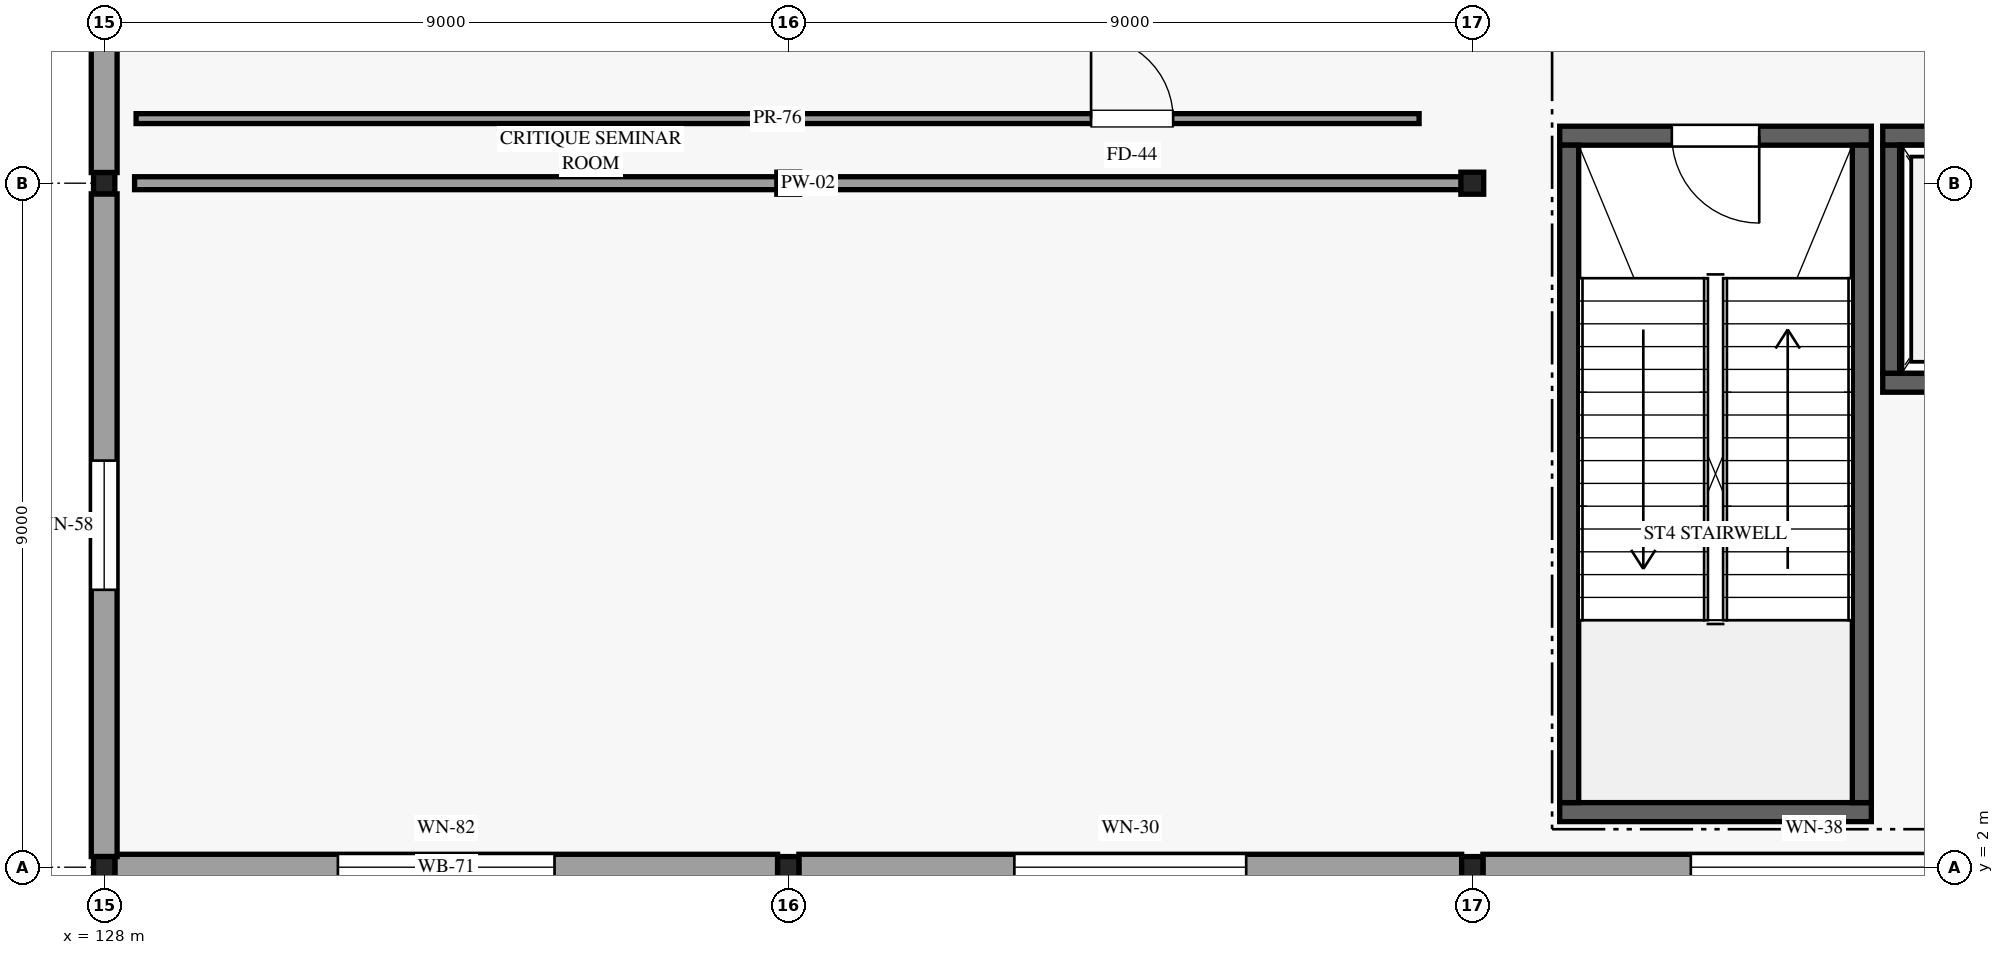
"""IFC4 building model, lengths in metres.
Left out: names, types, materials, properties, quantities, classifications, styles, units other than length and angle.
Written with IfcOpenShell. Run it as: python <this file> out.ifc"""

import sys

from ifc_helpers import new_model, si_unit, direction, frame, frame_2d, origin, origin_2d, place, context, subcontext, project, spatial, rectangle, i_section, extrude, element, fill, save


model = new_model("IFC4")
c1 = context("Model", 3, precision=1e-05, world=origin(), true_north=direction((0.0, 1.0)))
c2 = subcontext(c1, "Body", "Model", "MODEL_VIEW")
j1 = project(units=[si_unit("LENGTHUNIT", "METRE"), si_unit("PLANEANGLEUNIT", "RADIAN")], contexts=[c1])
p1 = place(None, origin())
s1 = spatial("IfcSite", under=j1, at=p1, CompositionType="ELEMENT")
p2 = place(p1, origin())
s2 = spatial("IfcBuilding", under=s1, at=p2, CompositionType="ELEMENT")
p3 = place(p2, frame((0.0, 0.0, 10.2)))
s3 = spatial("IfcBuildingStorey", under=s2, at=p3, CompositionType="ELEMENT", Elevation=10.2)
for number, where, z_axis, x_axis in (
    (1, (128.0, 2.0, 0.0), (0.0, 0.0, 1.0), (1.0, 0.0, 0.0)),
    (2, (128.0, 11.0, 0.0), (0.0, 0.0, 1.0), (1.0, 0.0, 0.0)),
    (3, (137.0, 2.0, 0.0), (0.0, 0.0, 1.0), (1.0, 0.0, 0.0)),
):
    element("IfcColumn", number, at=place(p3, frame(where, z_axis=z_axis, x_axis=x_axis)), inside=s3, PredefinedType="COLUMN", context=c2, shape_type="SweptSolid", body=[
        extrude(i_section(OverallWidth=0.28, OverallDepth=0.28, WebThickness=0.01, FlangeThickness=0.018, FilletRadius=0.024, at=origin_2d()), origin(), (0.0, 0.0, 1.0), 4.8),
    ])
p4 = place(p3, frame((137.0, 11.0, 0.0), z_axis=(0.0, 0.0, 1.0), x_axis=(1.0, 0.0, 0.0)))
e4 = element("IfcColumn", 4, at=p4, inside=s3, PredefinedType="COLUMN", context=c2, shape_type="SweptSolid", body=[
    extrude(i_section(OverallWidth=0.3, OverallDepth=0.29, WebThickness=0.009, FlangeThickness=0.014, FilletRadius=0.027, at=origin_2d()), origin(), (0.0, 0.0, 1.0), 4.8),
])
p5 = place(p3, frame((146.0, 2.0, 0.0), z_axis=(0.0, 0.0, 1.0), x_axis=(1.0, 0.0, 0.0)))
e5 = element("IfcColumn", 5, at=p5, inside=s3, PredefinedType="COLUMN", context=c2, shape_type="SweptSolid", body=[
    extrude(i_section(OverallWidth=0.28, OverallDepth=0.28, WebThickness=0.01, FlangeThickness=0.018, FilletRadius=0.024, at=origin_2d()), origin(), (0.0, 0.0, 1.0), 4.8),
])
p6 = place(p3, frame((146.0, 11.0, 0.0), z_axis=(0.0, 0.0, 1.0), x_axis=(1.0, 0.0, 0.0)))
e6 = element("IfcColumn", 6, at=p6, inside=s3, PredefinedType="COLUMN", context=c2, shape_type="SweptSolid", body=[
    extrude(i_section(OverallWidth=0.3, OverallDepth=0.29, WebThickness=0.009, FlangeThickness=0.014, FilletRadius=0.027, at=origin_2d()), origin(), (0.0, 0.0, 1.0), 4.8),
])
p7 = place(p3, frame((128.14, 2.0, 0.0), z_axis=(0.0, 0.0, 1.0), x_axis=(1.0, 0.0, 0.0)))
e7 = element("IfcWall", 7, at=p7, inside=s3, PredefinedType="STANDARD", context=c2, shape_type="SweptSolid", body=[
    extrude(rectangle(XDim=8.72, YDim=0.34, at=frame_2d((4.36, 0.0))), origin(), (0.0, 0.0, 1.0), 4.115),
])
p8 = place(p7, frame((5.785, 0.0, 0.85), z_axis=(0.0, 0.0, 1.0), x_axis=(-1.0, 0.0, 0.0)))
e8 = element("IfcOpeningElement", 8, at=p8, cuts=e7, PredefinedType="OPENING", context=c2, shape_type="SweptSolid", body=[
    extrude(rectangle(XDim=2.85, YDim=2.5, at=frame_2d((1.425, 1.25))), frame((0.0, 0.18, 0.0), z_axis=(0.0, -1.0, 0.0), x_axis=(1.0, 0.0, 0.0)), (0.0, 0.0, 1.0), 0.36),
])
p9 = place(p3, frame((137.14, 2.0, 0.0), z_axis=(0.0, 0.0, 1.0), x_axis=(1.0, 0.0, 0.0)))
e9 = element("IfcWall", 9, at=p9, inside=s3, PredefinedType="STANDARD", context=c2, shape_type="SweptSolid", body=[
    extrude(rectangle(XDim=8.72, YDim=0.34, at=frame_2d((4.36, 0.0))), origin(), (0.0, 0.0, 1.0), 4.115),
])
p10 = place(p9, frame((5.885, 0.0, 0.85), z_axis=(0.0, 0.0, 1.0), x_axis=(-1.0, 0.0, 0.0)))
e10 = element("IfcOpeningElement", 10, at=p10, cuts=e9, PredefinedType="OPENING", context=c2, shape_type="SweptSolid", body=[
    extrude(rectangle(XDim=3.05, YDim=2.55, at=frame_2d((1.525, 1.275))), frame((0.0, 0.18, 0.0), z_axis=(0.0, -1.0, 0.0), x_axis=(1.0, 0.0, 0.0)), (0.0, 0.0, 1.0), 0.36),
])
p11 = place(p3, frame((146.14, 2.0, 0.0), z_axis=(0.0, 0.0, 1.0), x_axis=(1.0, 0.0, 0.0)))
e11 = element("IfcWall", 11, at=p11, inside=s3, PredefinedType="STANDARD", context=c2, shape_type="SweptSolid", body=[
    extrude(rectangle(XDim=8.72, YDim=0.34, at=frame_2d((4.36, 0.0))), origin(), (0.0, 0.0, 1.0), 4.115),
])
p12 = place(p11, frame((5.985, 0.0, 0.85), z_axis=(0.0, 0.0, 1.0), x_axis=(-1.0, 0.0, 0.0)))
e12 = element("IfcOpeningElement", 12, at=p12, cuts=e11, PredefinedType="OPENING", context=c2, shape_type="SweptSolid", body=[
    extrude(rectangle(XDim=3.25, YDim=2.6, at=frame_2d((1.625, 1.3))), frame((0.0, 0.18, 0.0), z_axis=(0.0, -1.0, 0.0), x_axis=(1.0, 0.0, 0.0)), (0.0, 0.0, 1.0), 0.36),
])
p13 = place(p3, frame((128.0, 2.14, 0.0), z_axis=(0.0, 0.0, 1.0), x_axis=(0.0, 1.0, 0.0)))
e13 = element("IfcWall", 13, at=p13, inside=s3, PredefinedType="STANDARD", context=c2, shape_type="SweptSolid", body=[
    extrude(rectangle(XDim=8.72, YDim=0.34, at=frame_2d((4.36, 0.0))), origin(), (0.0, 0.0, 1.0), 4.115),
])
p14 = place(p13, frame((3.51, 0.0, 0.85)))
e14 = element("IfcOpeningElement", 14, at=p14, cuts=e13, PredefinedType="OPENING", context=c2, shape_type="SweptSolid", body=[
    extrude(rectangle(XDim=1.7, YDim=2.3, at=frame_2d((0.85, 1.15))), frame((0.0, 0.18, 0.0), z_axis=(0.0, -1.0, 0.0), x_axis=(1.0, 0.0, 0.0)), (0.0, 0.0, 1.0), 0.36),
])
p15 = place(p3, frame((128.0, 11.14, 0.0), z_axis=(0.0, 0.0, 1.0), x_axis=(0.0, 1.0, 0.0)))
e15 = element("IfcWall", 15, at=p15, inside=s3, PredefinedType="STANDARD", context=c2, shape_type="SweptSolid", body=[
    extrude(rectangle(XDim=8.72, YDim=0.34, at=frame_2d((4.36, 0.0))), origin(), (0.0, 0.0, 1.0), 4.115),
])
p16 = place(p15, frame((3.31, 0.0, 0.85)))
e16 = element("IfcOpeningElement", 16, at=p16, cuts=e15, PredefinedType="OPENING", context=c2, shape_type="SweptSolid", body=[
    extrude(rectangle(XDim=2.1, YDim=2.45, at=frame_2d((1.05, 1.225))), frame((0.0, 0.18, 0.0), z_axis=(0.0, -1.0, 0.0), x_axis=(1.0, 0.0, 0.0)), (0.0, 0.0, 1.0), 0.36),
])
p17 = place(p3, frame((147.15, 11.625, 0.0), z_axis=(0.0, 0.0, 1.0), x_axis=(1.0, 0.0, 0.0)))
e17 = element("IfcWall", 17, at=p17, inside=s3, PredefinedType="SHEAR", context=c2, shape_type="SweptSolid", body=[
    extrude(rectangle(XDim=4.1, YDim=0.25, at=frame_2d((2.05, 0.0))), origin(), (0.0, 0.0, 1.0), 4.56),
])
p18 = place(p17, frame((2.625, 0.0, 0.0), z_axis=(0.0, 0.0, 1.0), x_axis=(-1.0, 0.0, 0.0)))
e18 = element("IfcOpeningElement", 18, at=p18, cuts=e17, PredefinedType="OPENING", context=c2, shape_type="SweptSolid", body=[
    extrude(rectangle(XDim=1.15, YDim=2.2, at=frame_2d((0.575, 1.1))), frame((0.0, 0.135, 0.0), z_axis=(0.0, -1.0, 0.0), x_axis=(1.0, 0.0, 0.0)), (0.0, 0.0, 1.0), 0.27),
])
p19 = place(p3, frame((147.15, 2.725, 0.0), z_axis=(0.0, 0.0, 1.0), x_axis=(1.0, 0.0, 0.0)))
e19 = element("IfcWall", 19, at=p19, inside=s3, PredefinedType="SHEAR", context=c2, shape_type="SweptSolid", body=[
    extrude(rectangle(XDim=4.1, YDim=0.25, at=frame_2d((2.05, 0.0))), origin(), (0.0, 0.0, 1.0), 4.56),
])
for number, where, z_axis, x_axis in (
    (20, (147.275, 2.85, 0.0), (0.0, 0.0, 1.0), (0.0, 1.0, 0.0)),
    (21, (151.125, 2.85, 0.0), (0.0, 0.0, 1.0), (0.0, 1.0, 0.0)),
):
    element("IfcWall", number, at=place(p3, frame(where, z_axis=z_axis, x_axis=x_axis)), inside=s3, PredefinedType="SHEAR", context=c2, shape_type="SweptSolid", body=[
        extrude(rectangle(XDim=8.65, YDim=0.25, at=frame_2d((4.325, 0.0))), origin(), (0.0, 0.0, 1.0), 4.56),
    ])
p20 = place(p3, frame((151.4, 11.625, 0.0), z_axis=(0.0, 0.0, 1.0), x_axis=(1.0, 0.0, 0.0)))
e22 = element("IfcWall", 22, at=p20, inside=s3, PredefinedType="SHEAR", context=c2, shape_type="SweptSolid", body=[
    extrude(rectangle(XDim=2.5, YDim=0.25, at=frame_2d((1.25, 0.0))), origin(), (0.0, 0.0, 1.0), 4.56),
])
p21 = place(p20, frame((0.7, 0.0, 0.0)))
e23 = element("IfcOpeningElement", 23, at=p21, cuts=e22, PredefinedType="OPENING", context=c2, shape_type="SweptSolid", body=[
    extrude(rectangle(XDim=1.1, YDim=2.2, at=frame_2d((0.55, 1.1))), frame((0.0, 0.135, 0.0), z_axis=(0.0, -1.0, 0.0), x_axis=(1.0, 0.0, 0.0)), (0.0, 0.0, 1.0), 0.27),
])
p22 = place(p3, frame((151.4, 8.375, 0.0), z_axis=(0.0, 0.0, 1.0), x_axis=(1.0, 0.0, 0.0)))
e24 = element("IfcWall", 24, at=p22, inside=s3, PredefinedType="SHEAR", context=c2, shape_type="SweptSolid", body=[
    extrude(rectangle(XDim=2.5, YDim=0.25, at=frame_2d((1.25, 0.0))), origin(), (0.0, 0.0, 1.0), 4.56),
])
p23 = place(p3, frame((151.525, 8.5, 0.0), z_axis=(0.0, 0.0, 1.0), x_axis=(0.0, 1.0, 0.0)))
e25 = element("IfcWall", 25, at=p23, inside=s3, PredefinedType="SHEAR", context=c2, shape_type="SweptSolid", body=[
    extrude(rectangle(XDim=3.0, YDim=0.25, at=frame_2d((1.5, 0.0))), origin(), (0.0, 0.0, 1.0), 4.56),
])
p24 = place(p3, frame((128.4, 11.0, 0.0), z_axis=(0.0, 0.0, 1.0), x_axis=(1.0, 0.0, 0.0)))
e26 = element("IfcWall", 26, at=p24, inside=s3, PredefinedType="PARTITIONING", context=c2, shape_type="SweptSolid", body=[
    extrude(rectangle(XDim=17.72, YDim=0.17, at=frame_2d((8.86, 0.0))), origin(), (0.0, 0.0, 1.0), 4.115),
])
p25 = place(p3, frame((128.42, 11.85, 0.0), z_axis=(0.0, 0.0, 1.0), x_axis=(1.0, 0.0, 0.0)))
e27 = element("IfcWall", 27, at=p25, inside=s3, PredefinedType="PARTITIONING", context=c2, shape_type="SweptSolid", body=[
    extrude(rectangle(XDim=16.88, YDim=0.13, at=frame_2d((8.44, 0.0))), origin(), (0.0, 0.0, 1.0), 4.115),
])
p26 = place(p25, frame((12.564, 0.0, 0.0)))
e28 = element("IfcOpeningElement", 28, at=p26, cuts=e27, PredefinedType="OPENING", context=c2, shape_type="SweptSolid", body=[
    extrude(rectangle(XDim=1.08, YDim=2.24, at=frame_2d((0.54, 1.12))), frame((0.0, 0.075, 0.0), z_axis=(0.0, -1.0, 0.0), x_axis=(1.0, 0.0, 0.0)), (0.0, 0.0, 1.0), 0.15),
])
p27 = place(p8, origin())
e29 = element("IfcWindow", 29, at=p27, inside=s3, PartitioningType="SINGLE_PANEL", PredefinedType="WINDOW", context=c2, shape_type="SweptSolid", body=[
    extrude(rectangle(XDim=2.85, YDim=2.5, at=frame_2d((1.425, 1.25))), frame((0.0, 0.03, 0.0), z_axis=(0.0, -1.0, 0.0), x_axis=(1.0, 0.0, 0.0)), (0.0, 0.0, 1.0), 0.06),
])
fill(e8, e29)
p28 = place(p10, origin())
e30 = element("IfcWindow", 30, at=p28, inside=s3, PartitioningType="SINGLE_PANEL", PredefinedType="WINDOW", context=c2, shape_type="SweptSolid", body=[
    extrude(rectangle(XDim=3.05, YDim=2.55, at=frame_2d((1.525, 1.275))), frame((0.0, 0.03, 0.0), z_axis=(0.0, -1.0, 0.0), x_axis=(1.0, 0.0, 0.0)), (0.0, 0.0, 1.0), 0.06),
])
fill(e10, e30)
p29 = place(p12, origin())
e31 = element("IfcWindow", 31, at=p29, inside=s3, PartitioningType="SINGLE_PANEL", PredefinedType="WINDOW", context=c2, shape_type="SweptSolid", body=[
    extrude(rectangle(XDim=3.25, YDim=2.6, at=frame_2d((1.625, 1.3))), frame((0.0, 0.03, 0.0), z_axis=(0.0, -1.0, 0.0), x_axis=(1.0, 0.0, 0.0)), (0.0, 0.0, 1.0), 0.06),
])
fill(e12, e31)
p30 = place(p14, origin())
e32 = element("IfcWindow", 32, at=p30, inside=s3, PartitioningType="SINGLE_PANEL", PredefinedType="WINDOW", context=c2, shape_type="SweptSolid", body=[
    extrude(rectangle(XDim=1.7, YDim=2.3, at=frame_2d((0.85, 1.15))), frame((0.0, 0.03, 0.0), z_axis=(0.0, -1.0, 0.0), x_axis=(1.0, 0.0, 0.0)), (0.0, 0.0, 1.0), 0.06),
])
fill(e14, e32)
p31 = place(p18, origin())
e33 = element("IfcDoor", 33, at=p31, inside=s3, OperationType="SINGLE_SWING_LEFT", PredefinedType="DOOR", context=c2, shape_type="SweptSolid", body=[
    extrude(rectangle(XDim=1.15, YDim=2.2, at=frame_2d((0.575, 1.1))), frame((0.0, 0.025, 0.0), z_axis=(0.0, -1.0, 0.0), x_axis=(1.0, 0.0, 0.0)), (0.0, 0.0, 1.0), 0.05),
])
fill(e18, e33)
p32 = place(p26, origin())
e34 = element("IfcDoor", 34, at=p32, inside=s3, OperationType="SINGLE_SWING_LEFT", PredefinedType="DOOR", context=c2, shape_type="SweptSolid", body=[
    extrude(rectangle(XDim=1.08, YDim=2.24, at=frame_2d((0.54, 1.12))), frame((0.0, 0.025, 0.0), z_axis=(0.0, -1.0, 0.0), x_axis=(1.0, 0.0, 0.0)), (0.0, 0.0, 1.0), 0.05),
])
fill(e28, e34)
save(model, sys.argv[1])
